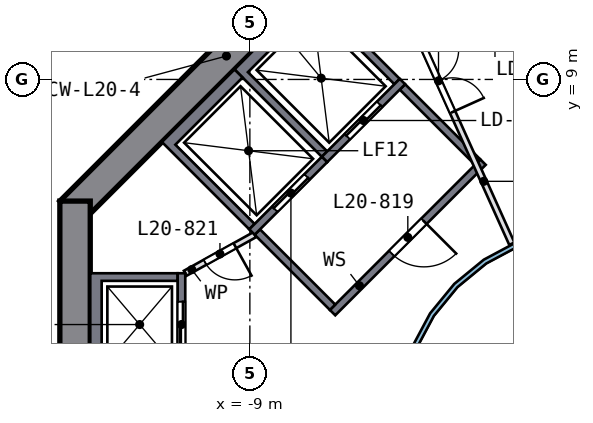
"""IFC4 building model, lengths in metres.
Left out: names, types, materials, properties, quantities, classifications, styles, units other than length and angle.
Written with IfcOpenShell. Run it as: python <this file> out.ifc"""

import sys

from ifc_helpers import new_model, si_unit, direction, frame, frame_2d, origin, place, context, subcontext, project, spatial, polyline, rectangle, outline, extrude, element, fill, save


model = new_model("IFC4")
c1 = context("Model", 3, precision=1e-05, world=origin(), true_north=direction((0.0, 1.0)))
c2 = subcontext(c1, "Body", "Model", "MODEL_VIEW")
j1 = project(units=[si_unit("LENGTHUNIT", "METRE"), si_unit("PLANEANGLEUNIT", "RADIAN")], contexts=[c1])
p1 = place(None, origin())
s1 = spatial("IfcSite", under=j1, at=p1, CompositionType="ELEMENT")
p2 = place(p1, origin())
s2 = spatial("IfcBuilding", under=s1, at=p2, CompositionType="ELEMENT")
p3 = place(p2, frame((0.0, 0.0, 89.5)))
s3 = spatial("IfcBuildingStorey", under=s2, at=p3, CompositionType="ELEMENT", Elevation=89.5)
p4 = place(p3, frame((-5.516, 13.717, 0.0), z_axis=(0.0, 0.0, 1.0), x_axis=(-0.707106781, -0.707106781, 0.0)))
e1 = element("IfcWall", 1, at=p4, inside=s3, PredefinedType="SHEAR", context=c2, shape_type="SweptSolid", body=[
    extrude(rectangle(XDim=11.598, YDim=0.8, at=frame_2d((5.799, 0.0))), origin(), (0.0, 0.0, 1.0), 3.5),
])
p5 = place(p3, frame((-13.6, 5.799, 0.0), z_axis=(0.0, 0.0, 1.0), x_axis=(0.0, -1.0, 0.0)))
e2 = element("IfcWall", 2, at=p5, inside=s3, PredefinedType="SHEAR", context=c2, shape_type="SweptSolid", body=[
    extrude(rectangle(XDim=11.598, YDim=0.8, at=frame_2d((5.799, 0.0))), origin(), (0.0, 0.0, 1.0), 3.5),
])
p6 = place(p5, frame((4.899, 0.0, 0.0)))
e3 = element("IfcOpeningElement", 3, at=p6, cuts=e2, PredefinedType="OPENING", context=c2, shape_type="SweptSolid", body=[
    extrude(rectangle(XDim=1.8, YDim=2.1, at=frame_2d((0.9, 1.05))), frame((0.0, 0.41, 0.0), z_axis=(0.0, -1.0, 0.0), x_axis=(1.0, 0.0, 0.0)), (0.0, 0.0, 1.0), 0.82),
])
p7 = place(p3, origin())
e4 = element("IfcWall", 4, at=p7, inside=s3, PredefinedType="SOLIDWALL", context=c2, shape_type="SweptSolid", body=[
    extrude(outline(polyline([(-13.2, 3.9), (-10.9, 3.9), (-10.9, 3.7), (-12.9, 3.7), (-12.9, 1.4), (-10.9, 1.4), (-10.9, 1.2), (-13.2, 1.2), (-13.2, 3.9)])), origin(), (0.0, 0.0, 1.0), 3.19),
])
p8 = place(p3, frame((-10.8, 1.2, 0.0), z_axis=(0.0, 0.0, 1.0), x_axis=(0.0, 1.0, 0.0)))
e5 = element("IfcWall", 5, at=p8, inside=s3, PredefinedType="SOLIDWALL", context=c2, shape_type="SweptSolid", body=[
    extrude(rectangle(XDim=2.7, YDim=0.2, at=frame_2d((1.35, 0.0))), origin(), (0.0, 0.0, 1.0), 3.19),
])
p9 = place(p8, frame((0.75, 0.0, 0.0)))
e6 = element("IfcOpeningElement", 6, at=p9, cuts=e5, PredefinedType="OPENING", context=c2, shape_type="SweptSolid", body=[
    extrude(rectangle(XDim=1.2, YDim=2.1, at=frame_2d((0.6, 1.05))), frame((0.0, 0.11, 0.0), z_axis=(0.0, -1.0, 0.0), x_axis=(1.0, 0.0, 0.0)), (0.0, 0.0, 1.0), 0.22),
])
p10 = place(p3, origin())
e7 = element("IfcWall", 7, at=p10, inside=s3, PredefinedType="SOLIDWALL", context=c2, shape_type="SweptSolid", body=[
    extrude(outline(polyline([(-9.405, 9.263), (-7.354, 11.314), (-5.056, 9.016), (-5.197, 8.874), (-7.283, 10.96), (-9.051, 9.192), (-6.965, 7.106), (-7.106, 6.965), (-9.405, 9.263)])), origin(), (0.0, 0.0, 1.0), 3.19),
])
p11 = place(p3, frame((-4.985, 8.945, 0.0), z_axis=(0.0, 0.0, 1.0), x_axis=(-0.707106781, -0.707106781, 0.0)))
e8 = element("IfcWall", 8, at=p11, inside=s3, PredefinedType="SOLIDWALL", context=c2, shape_type="SweptSolid", body=[
    extrude(rectangle(XDim=2.9, YDim=0.2, at=frame_2d((1.45, 0.0))), origin(), (0.0, 0.0, 1.0), 3.19),
])
p12 = place(p11, frame((0.85, 0.0, 0.0)))
e9 = element("IfcOpeningElement", 9, at=p12, cuts=e8, PredefinedType="OPENING", context=c2, shape_type="SweptSolid", body=[
    extrude(rectangle(XDim=1.2, YDim=2.1, at=frame_2d((0.6, 1.05))), frame((0.0, 0.11, 0.0), z_axis=(0.0, -1.0, 0.0), x_axis=(1.0, 0.0, 0.0)), (0.0, 0.0, 1.0), 0.22),
])
p13 = place(p3, origin())
e10 = element("IfcWall", 10, at=p13, inside=s3, PredefinedType="SOLIDWALL", context=c2, shape_type="SweptSolid", body=[
    extrude(outline(polyline([(-11.314, 7.354), (-9.405, 9.263), (-9.192, 9.051), (-10.96, 7.283), (-8.874, 5.197), (-9.016, 5.056), (-11.314, 7.354)])), origin(), (0.0, 0.0, 1.0), 3.19),
])
p14 = place(p3, frame((-7.036, 6.894, 0.0), z_axis=(0.0, 0.0, 1.0), x_axis=(-0.707106781, -0.707106781, 0.0)))
e11 = element("IfcWall", 11, at=p14, inside=s3, PredefinedType="SOLIDWALL", context=c2, shape_type="SweptSolid", body=[
    extrude(rectangle(XDim=2.7, YDim=0.2, at=frame_2d((1.35, 0.0))), origin(), (0.0, 0.0, 1.0), 3.19),
])
p15 = place(p14, frame((0.65, 0.0, 0.0)))
e12 = element("IfcOpeningElement", 12, at=p15, cuts=e11, PredefinedType="OPENING", context=c2, shape_type="SweptSolid", body=[
    extrude(rectangle(XDim=1.2, YDim=2.1, at=frame_2d((0.6, 1.05))), frame((0.0, 0.11, 0.0), z_axis=(0.0, -1.0, 0.0), x_axis=(1.0, 0.0, 0.0)), (0.0, 0.0, 1.0), 0.22),
])
p16 = place(p3, frame((-2.864, 6.823, 0.0), z_axis=(0.0, 0.0, 1.0), x_axis=(-0.707106781, -0.707106781, 0.0)))
e13 = element("IfcWall", 13, at=p16, inside=s3, PredefinedType="SOLIDWALL", context=c2, shape_type="SweptSolid", body=[
    extrude(rectangle(XDim=5.6, YDim=0.2, at=frame_2d((2.8, 0.0))), origin(), (0.0, 0.0, 1.0), 3.19),
])
p17 = place(p16, frame((2.2, 0.0, 0.0)))
e14 = element("IfcOpeningElement", 14, at=p17, cuts=e13, PredefinedType="OPENING", context=c2, shape_type="SweptSolid", body=[
    extrude(rectangle(XDim=1.2, YDim=2.1, at=frame_2d((0.6, 1.05))), frame((0.0, 0.11, 0.0), z_axis=(0.0, -1.0, 0.0), x_axis=(1.0, 0.0, 0.0)), (0.0, 0.0, 1.0), 0.22),
])
for number, where, z_axis, x_axis in (
    (15, (-3.005, 6.823, 0.0), (0.0, 0.0, 1.0), (-0.707, 0.707, 0.0)),
    (16, (-6.823, 3.005, 0.0), (0.0, 0.0, 1.0), (-0.707, 0.707, 0.0)),
):
    element("IfcWall", number, at=place(p3, frame(where, z_axis=z_axis, x_axis=x_axis)), inside=s3, PredefinedType="SOLIDWALL", context=c2, shape_type="SweptSolid", body=[
        extrude(rectangle(XDim=2.8, YDim=0.2, at=frame_2d((1.4, 0.0))), origin(), (0.0, 0.0, 1.0), 3.19),
    ])
p18 = place(p3, frame((-8.874, 4.914, 0.0), z_axis=(0.0, 0.0, 1.0), x_axis=(-0.874129705, -0.485692555, 0.0)))
e17 = element("IfcWall", 17, at=p18, inside=s3, PredefinedType="PARTITIONING", context=c2, shape_type="SweptSolid", body=[
    extrude(rectangle(XDim=2.089, YDim=0.15, at=frame_2d((1.044, 0.0))), origin(), (0.0, 0.0, 1.0), 3.19),
])
p19 = place(p18, frame((0.594, 0.0, 0.0)))
e18 = element("IfcOpeningElement", 18, at=p19, cuts=e17, PredefinedType="OPENING", context=c2, shape_type="SweptSolid", body=[
    extrude(rectangle(XDim=0.9, YDim=2.1, at=frame_2d((0.45, 1.05))), frame((0.0, 0.085, 0.0), z_axis=(0.0, -1.0, 0.0), x_axis=(1.0, 0.0, 0.0)), (0.0, 0.0, 1.0), 0.17),
])
p20 = place(p3, frame((-5.784, 12.844, 0.0), z_axis=(0.0, 0.0, 1.0), x_axis=(0.41058002, -0.91182457, 0.0)))
e19 = element("IfcWall", 19, at=p20, inside=s3, PredefinedType="PARTITIONING", context=c2, shape_type="SweptSolid", body=[
    extrude(rectangle(XDim=8.956, YDim=0.15, at=frame_2d((4.478, 0.0))), origin(), (0.0, 0.0, 1.0), 3.19),
])
p21 = place(p20, frame((3.356, 0.0, 0.0)))
e20 = element("IfcOpeningElement", 20, at=p21, cuts=e19, PredefinedType="OPENING", context=c2, shape_type="SweptSolid", body=[
    extrude(rectangle(XDim=1.8, YDim=2.1, at=frame_2d((0.9, 1.05))), frame((0.0, 0.085, 0.0), z_axis=(0.0, -1.0, 0.0), x_axis=(1.0, 0.0, 0.0)), (0.0, 0.0, 1.0), 0.17),
])
p22 = place(p3, origin())
e21 = element("IfcWall", 21, at=p22, inside=s3, PredefinedType="SOLIDWALL", context=c2, shape_type="SweptSolid", body=[
    extrude(outline(polyline([(5.021, -0.999), (4.73, -1.959), (4.257, -2.844), (3.62, -3.62), (2.844, -4.257), (1.959, -4.73), (0.999, -5.021), (0.0, -5.12), (-0.999, -5.021), (-1.959, -4.73), (-2.844, -4.257), (-3.62, -3.62), (-4.257, -2.844), (-4.73, -1.959), (-5.021, -0.999), (-5.12, 0.0), (-5.021, 0.999), (-4.73, 1.959), (-4.257, 2.844), (-3.62, 3.62), (-2.844, 4.257), (-1.959, 4.73), (-0.999, 5.021), (0.0, 5.12), (0.999, 5.021), (1.959, 4.73), (2.844, 4.257), (3.62, 3.62), (4.257, 2.844), (4.73, 1.959), (5.021, 0.999), (5.12, 0.0), (5.021, -0.999)]), holes=[polyline([(4.904, 0.976), (4.619, 1.913), (4.157, 2.778), (3.535, 3.535), (2.778, 4.157), (1.913, 4.619), (0.976, 4.904), (0.0, 5.0), (-0.976, 4.904), (-1.913, 4.619), (-2.778, 4.157), (-3.535, 3.535), (-4.157, 2.778), (-4.619, 1.913), (-4.904, 0.976), (-5.0, 0.0), (-4.904, -0.976), (-4.619, -1.913), (-4.157, -2.778), (-3.535, -3.535), (-2.778, -4.157), (-1.913, -4.619), (-0.976, -4.904), (0.0, -5.0), (0.976, -4.904), (1.913, -4.619), (2.778, -4.157), (3.535, -3.535), (4.157, -2.778), (4.619, -1.913), (4.904, -0.976), (5.0, 0.0), (4.904, 0.976)])]), origin(), (0.0, 0.0, 1.0), 3.19),
])
p23 = place(p3, frame((-15.666, 9.622, 0.0), z_axis=(0.0, 0.0, 1.0), x_axis=(0.726079372, 0.687610897, 0.0)))
e22 = element("IfcWall", 22, at=p23, inside=s3, PredefinedType="SOLIDWALL", context=c2, shape_type="SweptSolid", body=[
    extrude(rectangle(XDim=9.317, YDim=0.2, at=frame_2d((4.658, 0.0))), origin(), (0.0, 0.0, 1.0), 3.19),
])
p24 = place(p23, frame((1.9, 0.0, 0.0)))
e23 = element("IfcOpeningElement", 23, at=p24, cuts=e22, PredefinedType="OPENING", context=c2, shape_type="SweptSolid", body=[
    extrude(rectangle(XDim=1.0, YDim=2.1, at=frame_2d((0.5, 1.05))), frame((0.0, 0.11, 0.0), z_axis=(0.0, -1.0, 0.0), x_axis=(1.0, 0.0, 0.0)), (0.0, 0.0, 1.0), 0.22),
])
p25 = place(p9, origin())
e24 = element("IfcDoor", 24, at=p25, inside=s3, OperationType="DOUBLE_DOOR_SLIDING", PredefinedType="DOOR", context=c2, shape_type="SweptSolid", body=[
    extrude(rectangle(XDim=1.2, YDim=2.1, at=frame_2d((0.6, 1.05))), frame((0.0, 0.025, 0.0), z_axis=(0.0, -1.0, 0.0), x_axis=(1.0, 0.0, 0.0)), (0.0, 0.0, 1.0), 0.05),
])
fill(e6, e24)
p26 = place(p12, origin())
e25 = element("IfcDoor", 25, at=p26, inside=s3, OperationType="DOUBLE_DOOR_SLIDING", PredefinedType="DOOR", context=c2, shape_type="SweptSolid", body=[
    extrude(rectangle(XDim=1.2, YDim=2.1, at=frame_2d((0.6, 1.05))), frame((0.0, 0.025, 0.0), z_axis=(0.0, -1.0, 0.0), x_axis=(1.0, 0.0, 0.0)), (0.0, 0.0, 1.0), 0.05),
])
fill(e9, e25)
p27 = place(p15, origin())
e26 = element("IfcDoor", 26, at=p27, inside=s3, OperationType="DOUBLE_DOOR_SLIDING", PredefinedType="DOOR", context=c2, shape_type="SweptSolid", body=[
    extrude(rectangle(XDim=1.2, YDim=2.1, at=frame_2d((0.6, 1.05))), frame((0.0, 0.025, 0.0), z_axis=(0.0, -1.0, 0.0), x_axis=(1.0, 0.0, 0.0)), (0.0, 0.0, 1.0), 0.05),
])
fill(e12, e26)
p28 = place(p17, origin())
e27 = element("IfcDoor", 27, at=p28, inside=s3, OperationType="SINGLE_SWING_LEFT", PredefinedType="DOOR", context=c2, shape_type="SweptSolid", body=[
    extrude(rectangle(XDim=1.2, YDim=2.1, at=frame_2d((0.6, 1.05))), frame((0.0, 0.025, 0.0), z_axis=(0.0, -1.0, 0.0), x_axis=(1.0, 0.0, 0.0)), (0.0, 0.0, 1.0), 0.05),
])
fill(e14, e27)
p29 = place(p19, origin())
e28 = element("IfcDoor", 28, at=p29, inside=s3, OperationType="SINGLE_SWING_LEFT", PredefinedType="DOOR", context=c2, shape_type="SweptSolid", body=[
    extrude(rectangle(XDim=0.9, YDim=2.1, at=frame_2d((0.45, 1.05))), frame((0.0, 0.025, 0.0), z_axis=(0.0, -1.0, 0.0), x_axis=(1.0, 0.0, 0.0)), (0.0, 0.0, 1.0), 0.05),
])
fill(e18, e28)
p30 = place(p21, origin())
e29 = element("IfcDoor", 29, at=p30, inside=s3, OperationType="DOUBLE_DOOR_SINGLE_SWING", PredefinedType="DOOR", context=c2, shape_type="SweptSolid", body=[
    extrude(rectangle(XDim=1.8, YDim=2.1, at=frame_2d((0.9, 1.05))), frame((0.0, 0.025, 0.0), z_axis=(0.0, -1.0, 0.0), x_axis=(1.0, 0.0, 0.0)), (0.0, 0.0, 1.0), 0.05),
])
fill(e20, e29)
save(model, sys.argv[1])
